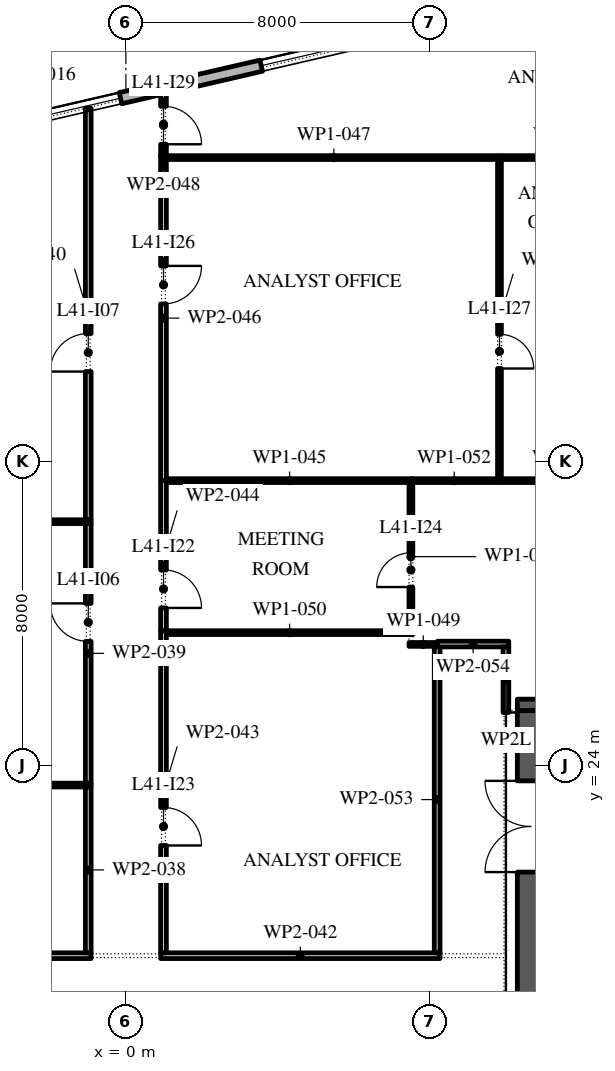
"""IFC4 building model, lengths in metres.
Left out: names, types, materials, properties, quantities, classifications, styles, units other than length and angle.
Written with IfcOpenShell. Run it as: python <this file> out.ifc"""

import sys

from ifc_helpers import new_model, si_unit, direction, frame, frame_2d, origin, place, context, subcontext, project, spatial, rectangle, extrude, element, fill, save


model = new_model("IFC4")
c1 = context("Model", 3, precision=1e-05, world=origin(), true_north=direction((0.0, 1.0)))
c2 = subcontext(c1, "Body", "Model", "MODEL_VIEW")
j1 = project(units=[si_unit("LENGTHUNIT", "METRE"), si_unit("PLANEANGLEUNIT", "RADIAN")], contexts=[c1])
p1 = place(None, origin())
s1 = spatial("IfcSite", under=j1, at=p1, CompositionType="ELEMENT")
p2 = place(p1, origin())
s2 = spatial("IfcBuilding", under=s1, at=p2, CompositionType="ELEMENT")
p3 = place(p2, frame((0.0, 0.0, 188.4)))
s3 = spatial("IfcBuildingStorey", under=s2, at=p3, CompositionType="ELEMENT", Elevation=188.4)
p4 = place(p3, frame((17.592, 45.657, 0.0), z_axis=(0.0, 0.0, 1.0), x_axis=(-0.974370243697, -0.224950279389, 0.0)))
e1 = element("IfcWall", 1, at=p4, inside=s3, PredefinedType="STANDARD", context=c2, shape_type="SweptSolid", body=[
    extrude(rectangle(XDim=49.5, YDim=0.3, at=frame_2d((24.75, 0.0))), origin(), (0.0, 0.0, 1.0), 4.0),
])
p5 = place(p4, frame((2.8, 0.0, 0.0)))
e2 = element("IfcOpeningElement", 2, at=p5, cuts=e1, PredefinedType="OPENING", context=c2, shape_type="SweptSolid", body=[
    extrude(rectangle(XDim=2.4, YDim=3.5, at=frame_2d((1.2, 1.75))), frame((0.0, 0.16, 0.0), z_axis=(0.0, -1.0, 0.0), x_axis=(1.0, 0.0, 0.0)), (0.0, 0.0, 1.0), 0.32),
])
p6 = place(p4, frame((9.9, 0.0, 0.45)))
e3 = element("IfcOpeningElement", 3, at=p6, cuts=e1, PredefinedType="OPENING", context=c2, shape_type="SweptSolid", body=[
    extrude(rectangle(XDim=4.5, YDim=2.45, at=frame_2d((2.25, 1.225))), frame((0.0, 0.16, 0.0), z_axis=(0.0, -1.0, 0.0), x_axis=(1.0, 0.0, 0.0)), (0.0, 0.0, 1.0), 0.32),
])
p7 = place(p4, frame((18.2, 0.0, 0.45)))
e4 = element("IfcOpeningElement", 4, at=p7, cuts=e1, PredefinedType="OPENING", context=c2, shape_type="SweptSolid", body=[
    extrude(rectangle(XDim=4.5, YDim=2.45, at=frame_2d((2.25, 1.225))), frame((0.0, 0.16, 0.0), z_axis=(0.0, -1.0, 0.0), x_axis=(1.0, 0.0, 0.0)), (0.0, 0.0, 1.0), 0.32),
])
p8 = place(p4, frame((26.5, 0.0, 0.45)))
e5 = element("IfcOpeningElement", 5, at=p8, cuts=e1, PredefinedType="OPENING", context=c2, shape_type="SweptSolid", body=[
    extrude(rectangle(XDim=4.5, YDim=2.525, at=frame_2d((2.25, 1.262))), frame((0.0, 0.16, 0.0), z_axis=(0.0, -1.0, 0.0), x_axis=(1.0, 0.0, 0.0)), (0.0, 0.0, 1.0), 0.32),
])
p9 = place(p4, frame((35.85, 0.0, 0.0)))
e6 = element("IfcOpeningElement", 6, at=p9, cuts=e1, PredefinedType="OPENING", context=c2, shape_type="SweptSolid", body=[
    extrude(rectangle(XDim=2.4, YDim=3.5, at=frame_2d((1.2, 1.75))), frame((0.0, 0.16, 0.0), z_axis=(0.0, -1.0, 0.0), x_axis=(1.0, 0.0, 0.0)), (0.0, 0.0, 1.0), 0.32),
])
p10 = place(p4, frame((43.1, 0.0, 0.45)))
e7 = element("IfcOpeningElement", 7, at=p10, cuts=e1, PredefinedType="OPENING", context=c2, shape_type="SweptSolid", body=[
    extrude(rectangle(XDim=4.5, YDim=2.675, at=frame_2d((2.25, 1.337))), frame((0.0, 0.16, 0.0), z_axis=(0.0, -1.0, 0.0), x_axis=(1.0, 0.0, 0.0)), (0.0, 0.0, 1.0), 0.32),
])
p11 = place(p3, frame((10.65, -2.45, 0.0), z_axis=(0.0, 0.0, 1.0), x_axis=(0.0, 1.0, 0.0)))
e8 = element("IfcWall", 8, at=p11, inside=s3, PredefinedType="SHEAR", context=c2, shape_type="SweptSolid", body=[
    extrude(rectangle(XDim=27.9, YDim=0.7, at=frame_2d((13.95, 0.0))), origin(), (0.0, 0.0, 1.0), 4.0),
])
p12 = place(p11, frame((23.65, 0.0, 0.0)))
e9 = element("IfcOpeningElement", 9, at=p12, cuts=e8, PredefinedType="OPENING", context=c2, shape_type="SweptSolid", body=[
    extrude(rectangle(XDim=2.4, YDim=2.1, at=frame_2d((1.2, 1.05))), frame((0.0, 0.36, 0.0), z_axis=(0.0, -1.0, 0.0), x_axis=(1.0, 0.0, 0.0)), (0.0, 0.0, 1.0), 0.72),
])
p13 = place(p11, frame((1.387, 0.0, 0.0)))
e10 = element("IfcOpeningElement", 10, at=p13, cuts=e8, PredefinedType="OPENING", context=c2, shape_type="SweptSolid", body=[
    extrude(rectangle(XDim=0.9, YDim=2.1, at=frame_2d((0.45, 1.05))), frame((0.0, 0.36, 0.0), z_axis=(0.0, -1.0, 0.0), x_axis=(1.0, 0.0, 0.0)), (0.0, 0.0, 1.0), 0.72),
])
p14 = place(p11, frame((4.562, 0.0, 0.0)))
e11 = element("IfcOpeningElement", 11, at=p14, cuts=e8, PredefinedType="OPENING", context=c2, shape_type="SweptSolid", body=[
    extrude(rectangle(XDim=1.0, YDim=2.1, at=frame_2d((0.5, 1.05))), frame((0.0, 0.36, 0.0), z_axis=(0.0, -1.0, 0.0), x_axis=(1.0, 0.0, 0.0)), (0.0, 0.0, 1.0), 0.72),
])
p15 = place(p3, frame((10.3, 25.6, 0.0), z_axis=(0.0, 0.0, 1.0), x_axis=(1.0, 0.0, 0.0)))
e12 = element("IfcWall", 12, at=p15, inside=s3, PredefinedType="SHEAR", context=c2, shape_type="SweptSolid", body=[
    extrude(rectangle(XDim=11.4, YDim=0.3, at=frame_2d((5.7, 0.0))), origin(), (0.0, 0.0, 1.0), 4.0),
])
p16 = place(p3, frame((-8.275, 19.0, 0.0), z_axis=(0.0, 0.0, 1.0), x_axis=(1.0, 0.0, 0.0)))
e13 = element("IfcWall", 13, at=p16, inside=s3, PredefinedType="PARTITIONING", context=c2, shape_type="SweptSolid", body=[
    extrude(rectangle(XDim=7.36, YDim=0.15, at=frame_2d((3.68, 0.0))), origin(), (0.0, 0.0, 1.0), 4.0),
])
p17 = place(p16, frame((4.635, 0.0, 0.0)))
e14 = element("IfcOpeningElement", 14, at=p17, cuts=e13, PredefinedType="OPENING", context=c2, shape_type="SweptSolid", body=[
    extrude(rectangle(XDim=1.0, YDim=2.1, at=frame_2d((0.5, 1.05))), frame((0.0, 0.085, 0.0), z_axis=(0.0, -1.0, 0.0), x_axis=(1.0, 0.0, 0.0)), (0.0, 0.0, 1.0), 0.17),
])
p18 = place(p3, frame((-6.425, 23.49, 0.0), z_axis=(0.0, 0.0, 1.0), x_axis=(1.0, 0.0, 0.0)))
e15 = element("IfcWall", 15, at=p18, inside=s3, PredefinedType="PARTITIONING", context=c2, shape_type="SweptSolid", body=[
    extrude(rectangle(XDim=5.51, YDim=0.1, at=frame_2d((2.755, 0.0))), origin(), (0.0, 0.0, 1.0), 4.0),
])
p19 = place(p3, frame((-6.5, 30.42, 0.0), z_axis=(0.0, 0.0, 1.0), x_axis=(1.0, 0.0, 0.0)))
e16 = element("IfcWall", 16, at=p19, inside=s3, PredefinedType="PARTITIONING", context=c2, shape_type="SweptSolid", body=[
    extrude(rectangle(XDim=5.585, YDim=0.1, at=frame_2d((2.792, 0.0))), origin(), (0.0, 0.0, 1.0), 4.0),
])
p20 = place(p3, frame((-0.99, 19.075, 0.0), z_axis=(0.0, 0.0, 1.0), x_axis=(0.0, 1.0, 0.0)))
e17 = element("IfcWall", 17, at=p20, inside=s3, PredefinedType="PARTITIONING", context=c2, shape_type="SweptSolid", body=[
    extrude(rectangle(XDim=4.365, YDim=0.15, at=frame_2d((2.183, 0.0))), origin(), (0.0, 0.0, 1.0), 4.0),
])
p21 = place(p3, frame((-0.99, 23.54, 0.0), z_axis=(0.0, 0.0, 1.0), x_axis=(0.0, 1.0, 0.0)))
e18 = element("IfcWall", 18, at=p21, inside=s3, PredefinedType="PARTITIONING", context=c2, shape_type="SweptSolid", body=[
    extrude(rectangle(XDim=6.83, YDim=0.15, at=frame_2d((3.415, 0.0))), origin(), (0.0, 0.0, 1.0), 4.0),
])
p22 = place(p21, frame((3.73, 0.0, 0.0)))
e19 = element("IfcOpeningElement", 19, at=p22, cuts=e18, PredefinedType="OPENING", context=c2, shape_type="SweptSolid", body=[
    extrude(rectangle(XDim=1.0, YDim=2.1, at=frame_2d((0.5, 1.05))), frame((0.0, 0.085, 0.0), z_axis=(0.0, -1.0, 0.0), x_axis=(1.0, 0.0, 0.0)), (0.0, 0.0, 1.0), 0.17),
])
p23 = place(p3, frame((-0.99, 30.47, 0.0), z_axis=(0.0, 0.0, 1.0), x_axis=(0.0, 1.0, 0.0)))
e20 = element("IfcWall", 20, at=p23, inside=s3, PredefinedType="PARTITIONING", context=c2, shape_type="SweptSolid", body=[
    extrude(rectangle(XDim=10.826, YDim=0.15, at=frame_2d((5.413, 0.0))), origin(), (0.0, 0.0, 1.0), 4.0),
])
p24 = place(p23, frame((3.9, 0.0, 0.0)))
e21 = element("IfcOpeningElement", 21, at=p24, cuts=e20, PredefinedType="OPENING", context=c2, shape_type="SweptSolid", body=[
    extrude(rectangle(XDim=1.0, YDim=2.1, at=frame_2d((0.5, 1.05))), frame((0.0, 0.085, 0.0), z_axis=(0.0, -1.0, 0.0), x_axis=(1.0, 0.0, 0.0)), (0.0, 0.0, 1.0), 0.17),
])
p25 = place(p3, frame((0.915, 19.0, 0.0), z_axis=(0.0, 0.0, 1.0), x_axis=(1.0, 0.0, 0.0)))
e22 = element("IfcWall", 22, at=p25, inside=s3, PredefinedType="PARTITIONING", context=c2, shape_type="SweptSolid", body=[
    extrude(rectangle(XDim=7.35, YDim=0.15, at=frame_2d((3.675, 0.0))), origin(), (0.0, 0.0, 1.0), 4.0),
])
p26 = place(p3, frame((0.99, 27.55, 0.0), z_axis=(0.0, 0.0, 1.0), x_axis=(0.0, -1.0, 0.0)))
e23 = element("IfcWall", 23, at=p26, inside=s3, PredefinedType="PARTITIONING", context=c2, shape_type="SweptSolid", body=[
    extrude(rectangle(XDim=8.475, YDim=0.15, at=frame_2d((4.238, 0.0))), origin(), (0.0, 0.0, 1.0), 4.0),
])
p27 = place(p26, frame((4.65, 0.0, 0.0)))
e24 = element("IfcOpeningElement", 24, at=p27, cuts=e23, PredefinedType="OPENING", context=c2, shape_type="SweptSolid", body=[
    extrude(rectangle(XDim=1.0, YDim=2.1, at=frame_2d((0.5, 1.05))), frame((0.0, 0.085, 0.0), z_axis=(0.0, -1.0, 0.0), x_axis=(1.0, 0.0, 0.0)), (0.0, 0.0, 1.0), 0.17),
])
p28 = place(p3, frame((0.99, 31.5, 0.0), z_axis=(0.0, 0.0, 1.0), x_axis=(0.0, -1.0, 0.0)))
e25 = element("IfcWall", 25, at=p28, inside=s3, PredefinedType="PARTITIONING", context=c2, shape_type="SweptSolid", body=[
    extrude(rectangle(XDim=3.95, YDim=0.15, at=frame_2d((1.975, 0.0))), origin(), (0.0, 0.0, 1.0), 4.0),
])
p29 = place(p28, frame((2.35, 0.0, 0.0)))
e26 = element("IfcOpeningElement", 26, at=p29, cuts=e25, PredefinedType="OPENING", context=c2, shape_type="SweptSolid", body=[
    extrude(rectangle(XDim=1.0, YDim=2.1, at=frame_2d((0.5, 1.05))), frame((0.0, 0.085, 0.0), z_axis=(0.0, -1.0, 0.0), x_axis=(1.0, 0.0, 0.0)), (0.0, 0.0, 1.0), 0.17),
])
p30 = place(p3, frame((1.065, 31.5, 0.0), z_axis=(0.0, 0.0, 1.0), x_axis=(1.0, 0.0, 0.0)))
e27 = element("IfcWall", 27, at=p30, inside=s3, PredefinedType="PARTITIONING", context=c2, shape_type="SweptSolid", body=[
    extrude(rectangle(XDim=6.485, YDim=0.1, at=frame_2d((3.243, 0.0))), origin(), (0.0, 0.0, 1.0), 4.0),
])
p31 = place(p3, frame((0.99, 40.05, 0.0), z_axis=(0.0, 0.0, 1.0), x_axis=(0.0, -1.0, 0.0)))
e28 = element("IfcWall", 28, at=p31, inside=s3, PredefinedType="PARTITIONING", context=c2, shape_type="SweptSolid", body=[
    extrude(rectangle(XDim=8.55, YDim=0.15, at=frame_2d((4.275, 0.0))), origin(), (0.0, 0.0, 1.0), 4.0),
])
p32 = place(p31, frame((2.9, 0.0, 0.0)))
e29 = element("IfcOpeningElement", 29, at=p32, cuts=e28, PredefinedType="OPENING", context=c2, shape_type="SweptSolid", body=[
    extrude(rectangle(XDim=1.0, YDim=2.1, at=frame_2d((0.5, 1.05))), frame((0.0, 0.085, 0.0), z_axis=(0.0, -1.0, 0.0), x_axis=(1.0, 0.0, 0.0)), (0.0, 0.0, 1.0), 0.17),
])
p33 = place(p3, frame((1.065, 40.0, 0.0), z_axis=(0.0, 0.0, 1.0), x_axis=(1.0, 0.0, 0.0)))
e30 = element("IfcWall", 30, at=p33, inside=s3, PredefinedType="PARTITIONING", context=c2, shape_type="SweptSolid", body=[
    extrude(rectangle(XDim=8.815, YDim=0.1, at=frame_2d((4.407, 0.0))), origin(), (0.0, 0.0, 1.0), 4.0),
])
p34 = place(p3, frame((0.99, 41.753, 0.0), z_axis=(0.0, 0.0, 1.0), x_axis=(0.0, -1.0, 0.0)))
e31 = element("IfcWall", 31, at=p34, inside=s3, PredefinedType="PARTITIONING", context=c2, shape_type="SweptSolid", body=[
    extrude(rectangle(XDim=1.753, YDim=0.15, at=frame_2d((0.876, 0.0))), origin(), (0.0, 0.0, 1.0), 4.0),
])
p35 = place(p34, frame((0.403, 0.0, 0.0)))
e32 = element("IfcOpeningElement", 32, at=p35, cuts=e31, PredefinedType="OPENING", context=c2, shape_type="SweptSolid", body=[
    extrude(rectangle(XDim=1.0, YDim=2.1, at=frame_2d((0.5, 1.05))), frame((0.0, 0.085, 0.0), z_axis=(0.0, -1.0, 0.0), x_axis=(1.0, 0.0, 0.0)), (0.0, 0.0, 1.0), 0.17),
])
p36 = place(p3, frame((7.45, 27.19, 0.0), z_axis=(0.0, 0.0, 1.0), x_axis=(1.0, 0.0, 0.0)))
e33 = element("IfcWall", 33, at=p36, inside=s3, PredefinedType="PARTITIONING", context=c2, shape_type="SweptSolid", body=[
    extrude(rectangle(XDim=0.75, YDim=0.1, at=frame_2d((0.375, 0.0))), origin(), (0.0, 0.0, 1.0), 4.0),
])
p37 = place(p3, frame((7.55, 27.5, 0.0), z_axis=(0.0, 0.0, 1.0), x_axis=(-1.0, 0.0, 0.0)))
e34 = element("IfcWall", 34, at=p37, inside=s3, PredefinedType="PARTITIONING", context=c2, shape_type="SweptSolid", body=[
    extrude(rectangle(XDim=6.485, YDim=0.1, at=frame_2d((3.243, 0.0))), origin(), (0.0, 0.0, 1.0), 4.0),
])
p38 = place(p3, frame((7.5, 31.45, 0.0), z_axis=(0.0, 0.0, 1.0), x_axis=(0.0, -1.0, 0.0)))
e35 = element("IfcWall", 35, at=p38, inside=s3, PredefinedType="PARTITIONING", context=c2, shape_type="SweptSolid", body=[
    extrude(rectangle(XDim=3.9, YDim=0.1, at=frame_2d((1.95, 0.0))), origin(), (0.0, 0.0, 1.0), 4.0),
])
p39 = place(p38, frame((1.85, 0.0, 0.0)))
e36 = element("IfcOpeningElement", 36, at=p39, cuts=e35, PredefinedType="OPENING", context=c2, shape_type="SweptSolid", body=[
    extrude(rectangle(XDim=0.9, YDim=2.1, at=frame_2d((0.45, 1.05))), frame((0.0, 0.06, 0.0), z_axis=(0.0, -1.0, 0.0), x_axis=(1.0, 0.0, 0.0)), (0.0, 0.0, 1.0), 0.12),
])
p40 = place(p3, frame((7.5, 31.5, 0.0), z_axis=(0.0, 0.0, 1.0), x_axis=(1.0, 0.0, 0.0)))
e37 = element("IfcWall", 37, at=p40, inside=s3, PredefinedType="PARTITIONING", context=c2, shape_type="SweptSolid", body=[
    extrude(rectangle(XDim=2.28, YDim=0.1, at=frame_2d((1.14, 0.0))), origin(), (0.0, 0.0, 1.0), 4.0),
])
p41 = place(p3, frame((8.19, 19.075, 0.0), z_axis=(0.0, 0.0, 1.0), x_axis=(0.0, 1.0, 0.0)))
e38 = element("IfcWall", 38, at=p41, inside=s3, PredefinedType="PARTITIONING", context=c2, shape_type="SweptSolid", body=[
    extrude(rectangle(XDim=8.065, YDim=0.15, at=frame_2d((4.032, 0.0))), origin(), (0.0, 0.0, 1.0), 4.0),
])
p42 = place(p3, frame((8.2, 27.2, 0.0), z_axis=(0.0, 0.0, 1.0), x_axis=(1.0, 0.0, 0.0)))
e39 = element("IfcWall", 39, at=p42, inside=s3, PredefinedType="PARTITIONING", context=c2, shape_type="SweptSolid", body=[
    extrude(rectangle(XDim=1.875, YDim=0.15, at=frame_2d((0.938, 0.0))), origin(), (0.0, 0.0, 1.0), 4.0),
])
p43 = place(p3, frame((9.78, 31.5, 0.0), z_axis=(0.0, 0.0, 1.0), x_axis=(1.0, 0.0, 0.0)))
e40 = element("IfcWall", 40, at=p43, inside=s3, PredefinedType="PARTITIONING", context=c2, shape_type="SweptSolid", body=[
    extrude(rectangle(XDim=3.77, YDim=0.1, at=frame_2d((1.885, 0.0))), origin(), (0.0, 0.0, 1.0), 4.0),
])
p44 = place(p3, frame((9.83, 39.95, 0.0), z_axis=(0.0, 0.0, 1.0), x_axis=(0.0, -1.0, 0.0)))
e41 = element("IfcWall", 41, at=p44, inside=s3, PredefinedType="PARTITIONING", context=c2, shape_type="SweptSolid", body=[
    extrude(rectangle(XDim=8.4, YDim=0.1, at=frame_2d((4.2, 0.0))), origin(), (0.0, 0.0, 1.0), 4.0),
])
p45 = place(p44, frame((4.6, 0.0, 0.0)))
e42 = element("IfcOpeningElement", 42, at=p45, cuts=e41, PredefinedType="OPENING", context=c2, shape_type="SweptSolid", body=[
    extrude(rectangle(XDim=0.9, YDim=2.1, at=frame_2d((0.45, 1.05))), frame((0.0, 0.06, 0.0), z_axis=(0.0, -1.0, 0.0), x_axis=(1.0, 0.0, 0.0)), (0.0, 0.0, 1.0), 0.12),
])
p46 = place(p3, frame((9.88, 40.0, 0.0), z_axis=(0.0, 0.0, 1.0), x_axis=(1.0, 0.0, 0.0)))
e43 = element("IfcWall", 43, at=p46, inside=s3, PredefinedType="PARTITIONING", context=c2, shape_type="SweptSolid", body=[
    extrude(rectangle(XDim=3.62, YDim=0.1, at=frame_2d((1.81, 0.0))), origin(), (0.0, 0.0, 1.0), 4.0),
])
p47 = place(p3, frame((10.0, 27.125, 0.0), z_axis=(0.0, 0.0, 1.0), x_axis=(0.0, -1.0, 0.0)))
e44 = element("IfcWall", 44, at=p47, inside=s3, PredefinedType="PARTITIONING", context=c2, shape_type="SweptSolid", body=[
    extrude(rectangle(XDim=1.725, YDim=0.15, at=frame_2d((0.863, 0.0))), origin(), (0.0, 0.0, 1.0), 3.02),
])
p48 = place(p6, origin())
e45 = element("IfcWindow", 45, at=p48, inside=s3, PartitioningType="DOUBLE_PANEL_VERTICAL", PredefinedType="WINDOW", context=c2, shape_type="SweptSolid", body=[
    extrude(rectangle(XDim=4.5, YDim=2.45, at=frame_2d((2.25, 1.225))), frame((0.0, 0.03, 0.0), z_axis=(0.0, -1.0, 0.0), x_axis=(1.0, 0.0, 0.0)), (0.0, 0.0, 1.0), 0.06),
])
fill(e3, e45)
p49 = place(p7, origin())
e46 = element("IfcWindow", 46, at=p49, inside=s3, PartitioningType="DOUBLE_PANEL_VERTICAL", PredefinedType="WINDOW", context=c2, shape_type="SweptSolid", body=[
    extrude(rectangle(XDim=4.5, YDim=2.45, at=frame_2d((2.25, 1.225))), frame((0.0, 0.03, 0.0), z_axis=(0.0, -1.0, 0.0), x_axis=(1.0, 0.0, 0.0)), (0.0, 0.0, 1.0), 0.06),
])
fill(e4, e46)
p50 = place(p12, origin())
e47 = element("IfcDoor", 47, at=p50, inside=s3, OperationType="DOUBLE_DOOR_SINGLE_SWING", PredefinedType="DOOR", context=c2, shape_type="SweptSolid", body=[
    extrude(rectangle(XDim=2.4, YDim=2.1, at=frame_2d((1.2, 1.05))), frame((0.0, 0.025, 0.0), z_axis=(0.0, -1.0, 0.0), x_axis=(1.0, 0.0, 0.0)), (0.0, 0.0, 1.0), 0.05),
])
fill(e9, e47)
p51 = place(p22, origin())
e48 = element("IfcDoor", 48, at=p51, inside=s3, OperationType="SINGLE_SWING_LEFT", PredefinedType="DOOR", context=c2, shape_type="SweptSolid", body=[
    extrude(rectangle(XDim=1.0, YDim=2.1, at=frame_2d((0.5, 1.05))), frame((0.0, 0.025, 0.0), z_axis=(0.0, -1.0, 0.0), x_axis=(1.0, 0.0, 0.0)), (0.0, 0.0, 1.0), 0.05),
])
fill(e19, e48)
p52 = place(p24, origin())
e49 = element("IfcDoor", 49, at=p52, inside=s3, OperationType="SINGLE_SWING_RIGHT", PredefinedType="DOOR", context=c2, shape_type="SweptSolid", body=[
    extrude(rectangle(XDim=1.0, YDim=2.1, at=frame_2d((0.5, 1.05))), frame((0.0, 0.025, 0.0), z_axis=(0.0, -1.0, 0.0), x_axis=(1.0, 0.0, 0.0)), (0.0, 0.0, 1.0), 0.05),
])
fill(e21, e49)
p53 = place(p29, origin())
e50 = element("IfcDoor", 50, at=p53, inside=s3, OperationType="SINGLE_SWING_LEFT", PredefinedType="DOOR", context=c2, shape_type="SweptSolid", body=[
    extrude(rectangle(XDim=1.0, YDim=2.1, at=frame_2d((0.5, 1.05))), frame((0.0, 0.025, 0.0), z_axis=(0.0, -1.0, 0.0), x_axis=(1.0, 0.0, 0.0)), (0.0, 0.0, 1.0), 0.05),
])
fill(e26, e50)
p54 = place(p27, origin())
e51 = element("IfcDoor", 51, at=p54, inside=s3, OperationType="SINGLE_SWING_LEFT", PredefinedType="DOOR", context=c2, shape_type="SweptSolid", body=[
    extrude(rectangle(XDim=1.0, YDim=2.1, at=frame_2d((0.5, 1.05))), frame((0.0, 0.025, 0.0), z_axis=(0.0, -1.0, 0.0), x_axis=(1.0, 0.0, 0.0)), (0.0, 0.0, 1.0), 0.05),
])
fill(e24, e51)
p55 = place(p39, frame((0.9, 0.0, 0.0), z_axis=(0.0, 0.0, 1.0), x_axis=(-1.0, 0.0, 0.0)))
e52 = element("IfcDoor", 52, at=p55, inside=s3, OperationType="SINGLE_SWING_RIGHT", PredefinedType="DOOR", context=c2, shape_type="SweptSolid", body=[
    extrude(rectangle(XDim=0.9, YDim=2.1, at=frame_2d((0.45, 1.05))), frame((0.0, 0.025, 0.0), z_axis=(0.0, -1.0, 0.0), x_axis=(1.0, 0.0, 0.0)), (0.0, 0.0, 1.0), 0.05),
])
fill(e36, e52)
p56 = place(p32, origin())
e53 = element("IfcDoor", 53, at=p56, inside=s3, OperationType="SINGLE_SWING_RIGHT", PredefinedType="DOOR", context=c2, shape_type="SweptSolid", body=[
    extrude(rectangle(XDim=1.0, YDim=2.1, at=frame_2d((0.5, 1.05))), frame((0.0, 0.025, 0.0), z_axis=(0.0, -1.0, 0.0), x_axis=(1.0, 0.0, 0.0)), (0.0, 0.0, 1.0), 0.05),
])
fill(e29, e53)
p57 = place(p45, origin())
e54 = element("IfcDoor", 54, at=p57, inside=s3, OperationType="SINGLE_SWING_LEFT", PredefinedType="DOOR", context=c2, shape_type="SweptSolid", body=[
    extrude(rectangle(XDim=0.9, YDim=2.1, at=frame_2d((0.45, 1.05))), frame((0.0, 0.025, 0.0), z_axis=(0.0, -1.0, 0.0), x_axis=(1.0, 0.0, 0.0)), (0.0, 0.0, 1.0), 0.05),
])
fill(e42, e54)
p58 = place(p35, origin())
e55 = element("IfcDoor", 55, at=p58, inside=s3, OperationType="SINGLE_SWING_LEFT", PredefinedType="DOOR", context=c2, shape_type="SweptSolid", body=[
    extrude(rectangle(XDim=1.0, YDim=2.1, at=frame_2d((0.5, 1.05))), frame((0.0, 0.025, 0.0), z_axis=(0.0, -1.0, 0.0), x_axis=(1.0, 0.0, 0.0)), (0.0, 0.0, 1.0), 0.05),
])
fill(e32, e55)
save(model, sys.argv[1])
